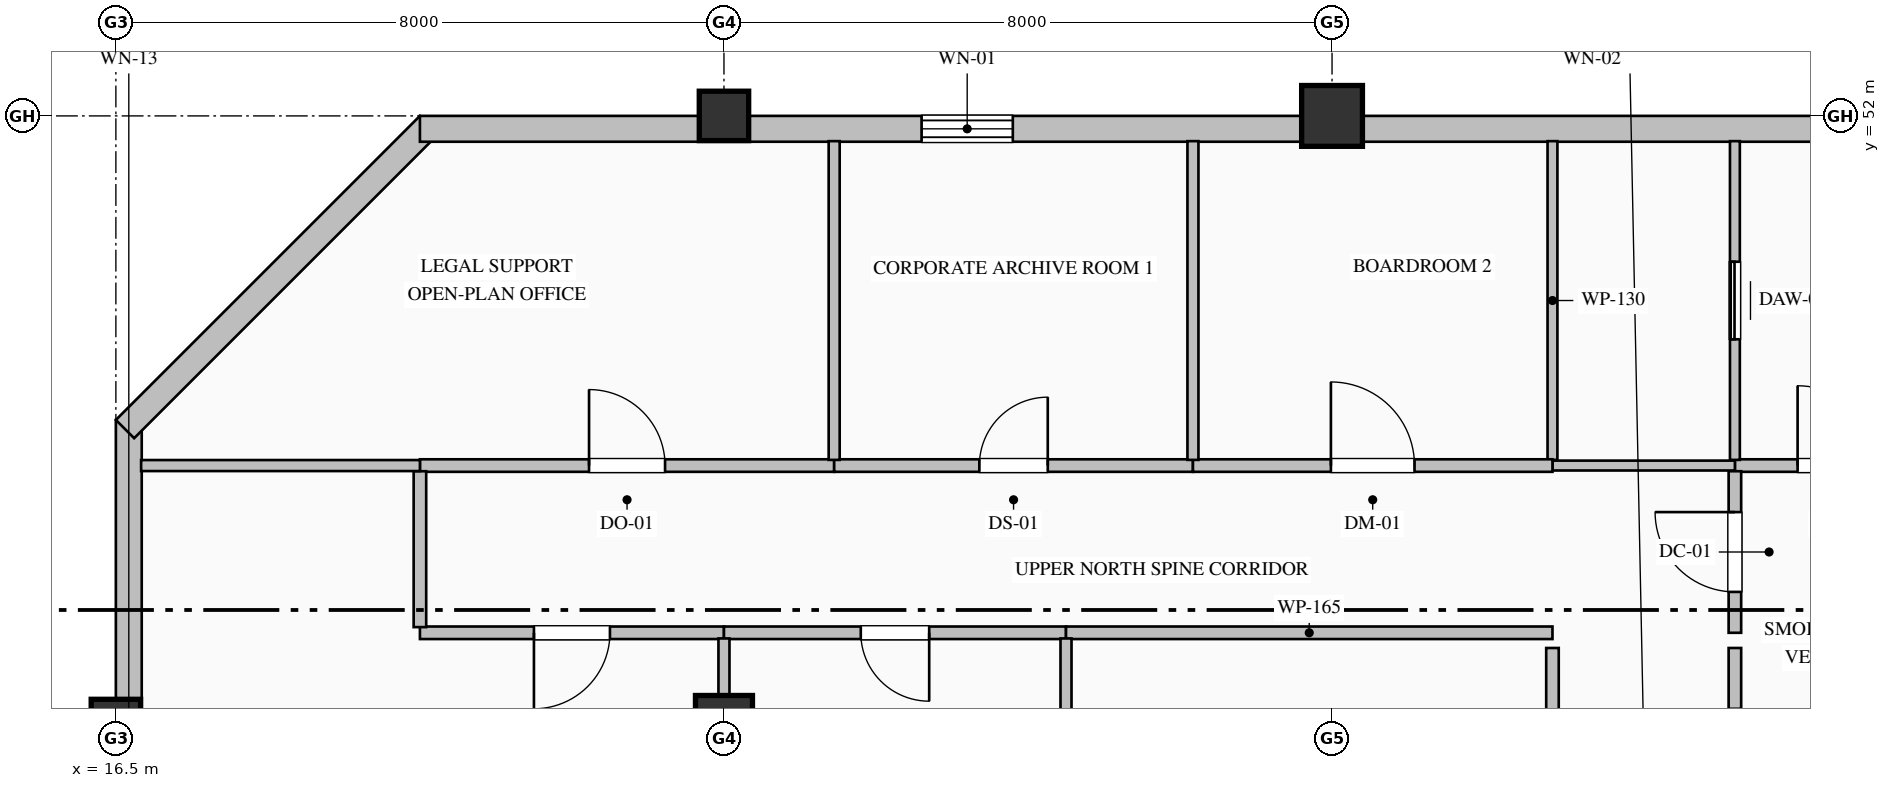
"""IFC4 building model, lengths in metres.
Left out: names, types, materials, properties, quantities, classifications, styles, units other than length and angle.
Written with IfcOpenShell. Run it as: python <this file> out.ifc"""

import sys

from ifc_helpers import new_model, si_unit, direction, frame, frame_2d, origin, origin_2d, place, context, subcontext, project, spatial, rectangle, hollow_rectangle, extrude, element, fill, save


model = new_model("IFC4")
c1 = context("Model", 3, precision=1e-05, world=origin(), true_north=direction((0.0, 1.0)))
c2 = subcontext(c1, "Body", "Model", "MODEL_VIEW")
j1 = project(units=[si_unit("LENGTHUNIT", "METRE"), si_unit("PLANEANGLEUNIT", "RADIAN")], contexts=[c1])
p1 = place(None, origin())
s1 = spatial("IfcSite", under=j1, at=p1, CompositionType="ELEMENT")
p2 = place(p1, origin())
s2 = spatial("IfcBuilding", under=s1, at=p2, CompositionType="ELEMENT")
p3 = place(p2, frame((0.0, 0.0, 363.2)))
s3 = spatial("IfcBuildingStorey", under=s2, at=p3, CompositionType="ELEMENT", Elevation=363.2)
p4 = place(p3, frame((16.5, 44.0, 0.0), z_axis=(0.0, 0.0, 1.0), x_axis=(1.0, 0.0, 0.0)))
e1 = element("IfcColumn", 1, at=p4, inside=s3, PredefinedType="COLUMN", context=c2, shape_type="SweptSolid", body=[
    extrude(hollow_rectangle(XDim=0.65, YDim=0.65, WallThickness=0.028, at=origin_2d()), origin(), (0.0, 0.0, 1.0), 4.0),
])
p5 = place(p3, frame((24.5, 44.0, 0.0), z_axis=(0.0, 0.0, 1.0), x_axis=(1.0, 0.0, 0.0)))
e2 = element("IfcColumn", 2, at=p5, inside=s3, PredefinedType="COLUMN", context=c2, shape_type="SweptSolid", body=[
    extrude(rectangle(XDim=0.75, YDim=0.75, at=origin_2d()), origin(), (0.0, 0.0, 1.0), 4.0),
])
p6 = place(p3, frame((24.5, 52.0, 0.0), z_axis=(0.0, 0.0, 1.0), x_axis=(1.0, 0.0, 0.0)))
e3 = element("IfcColumn", 3, at=p6, inside=s3, PredefinedType="COLUMN", context=c2, shape_type="SweptSolid", body=[
    extrude(hollow_rectangle(XDim=0.65, YDim=0.65, WallThickness=0.028, at=origin_2d()), origin(), (0.0, 0.0, 1.0), 4.0),
])
p7 = place(p3, frame((32.5, 52.0, 0.0), z_axis=(0.0, 0.0, 1.0), x_axis=(1.0, 0.0, 0.0)))
e4 = element("IfcColumn", 4, at=p7, inside=s3, PredefinedType="COLUMN", context=c2, shape_type="SweptSolid", body=[
    extrude(hollow_rectangle(XDim=0.8, YDim=0.8, WallThickness=0.032, at=origin_2d()), origin(), (0.0, 0.0, 1.0), 4.0),
])
p8 = place(p3, frame((16.67, 32.0, 0.0), z_axis=(0.0, 0.0, 1.0), x_axis=(0.0, 1.0, 0.0)))
e5 = element("IfcWall", 5, at=p8, inside=s3, PredefinedType="SOLIDWALL", context=c2, shape_type="SweptSolid", body=[
    extrude(rectangle(XDim=16.0, YDim=0.34, at=frame_2d((8.0, 0.0))), origin(), (0.0, 0.0, 1.0), 3.13),
])
p9 = place(p8, frame((6.525, 0.0, 0.9)))
e6 = element("IfcOpeningElement", 6, at=p9, cuts=e5, PredefinedType="OPENING", context=c2, shape_type="SweptSolid", body=[
    extrude(rectangle(XDim=1.35, YDim=1.85, at=frame_2d((0.675, 0.925))), frame((0.0, 0.18, 0.0), z_axis=(0.0, -1.0, 0.0), x_axis=(1.0, 0.0, 0.0)), (0.0, 0.0, 1.0), 0.36),
])
p10 = place(p8, frame((10.325, 0.0, 0.9)))
e7 = element("IfcOpeningElement", 7, at=p10, cuts=e5, PredefinedType="OPENING", context=c2, shape_type="SweptSolid", body=[
    extrude(rectangle(XDim=0.95, YDim=1.85, at=frame_2d((0.475, 0.925))), frame((0.0, 0.18, 0.0), z_axis=(0.0, -1.0, 0.0), x_axis=(1.0, 0.0, 0.0)), (0.0, 0.0, 1.0), 0.36),
])
p11 = place(p3, frame((16.62, 47.88, 0.0), z_axis=(0.0, 0.0, 1.0), x_axis=(0.707106781187, 0.707106781187, 0.0)))
e8 = element("IfcWall", 8, at=p11, inside=s3, PredefinedType="SOLIDWALL", context=c2, shape_type="SweptSolid", body=[
    extrude(rectangle(XDim=5.657, YDim=0.34, at=frame_2d((2.828, 0.0))), origin(), (0.0, 0.0, 1.0), 3.58),
])
p12 = place(p3, frame((20.5, 51.83, 0.0), z_axis=(0.0, 0.0, 1.0), x_axis=(1.0, 0.0, 0.0)))
e9 = element("IfcWall", 9, at=p12, inside=s3, PredefinedType="SOLIDWALL", context=c2, shape_type="SweptSolid", body=[
    extrude(rectangle(XDim=20.02, YDim=0.34, at=frame_2d((10.01, 0.0))), origin(), (0.0, 0.0, 1.0), 3.13),
])
p13 = place(p12, frame((6.6, 0.0, 0.7)))
e10 = element("IfcOpeningElement", 10, at=p13, cuts=e9, PredefinedType="OPENING", context=c2, shape_type="SweptSolid", body=[
    extrude(rectangle(XDim=1.2, YDim=1.85, at=frame_2d((0.6, 0.925))), frame((0.0, 0.18, 0.0), z_axis=(0.0, -1.0, 0.0), x_axis=(1.0, 0.0, 0.0)), (0.0, 0.0, 1.0), 0.36),
])
p14 = place(p3, frame((37.8, 47.4, 0.0), z_axis=(0.0, 0.0, 1.0), x_axis=(1.0, 0.0, 0.0)))
e11 = element("IfcWall", 11, at=p14, inside=s3, PredefinedType="PARTITIONING", context=c2, shape_type="SweptSolid", body=[
    extrude(rectangle(XDim=2.7, YDim=0.165, at=frame_2d((1.35, 0.0))), origin(), (0.0, 0.0, 1.0), 3.58),
])
p15 = place(p14, frame((0.825, 0.0, 0.0)))
e12 = element("IfcOpeningElement", 12, at=p15, cuts=e11, PredefinedType="OPENING", context=c2, shape_type="SweptSolid", body=[
    extrude(rectangle(XDim=1.05, YDim=2.15, at=frame_2d((0.525, 1.075))), frame((0.0, 0.093, 0.0), z_axis=(0.0, -1.0, 0.0), x_axis=(1.0, 0.0, 0.0)), (0.0, 0.0, 1.0), 0.185),
])
p16 = place(p3, frame((37.8, 45.2, 0.0), z_axis=(0.0, 0.0, 1.0), x_axis=(0.0, 1.0, 0.0)))
e13 = element("IfcWall", 13, at=p16, inside=s3, PredefinedType="PARTITIONING", context=c2, shape_type="SweptSolid", body=[
    extrude(rectangle(XDim=2.125, YDim=0.165, at=frame_2d((1.063, 0.0))), origin(), (0.0, 0.0, 1.0), 3.58),
])
p17 = place(p16, frame((0.538, 0.0, 0.0)))
e14 = element("IfcOpeningElement", 14, at=p17, cuts=e13, PredefinedType="OPENING", context=c2, shape_type="SweptSolid", body=[
    extrude(rectangle(XDim=1.05, YDim=2.15, at=frame_2d((0.525, 1.075))), frame((0.0, 0.093, 0.0), z_axis=(0.0, -1.0, 0.0), x_axis=(1.0, 0.0, 0.0)), (0.0, 0.0, 1.0), 0.185),
])
p18 = place(p3, frame((37.8, 44.2, 0.0), z_axis=(0.0, 0.0, 1.0), x_axis=(0.0, 1.0, 0.0)))
e15 = element("IfcWall", 15, at=p18, inside=s3, PredefinedType="PARTITIONING", context=c2, shape_type="SweptSolid", body=[
    extrude(rectangle(XDim=0.8, YDim=0.165, at=frame_2d((0.4, 0.0))), origin(), (0.0, 0.0, 1.0), 3.58),
])
p19 = place(p3, frame((37.8, 47.475, 0.0), z_axis=(0.0, 0.0, 1.0), x_axis=(0.0, 1.0, 0.0)))
e16 = element("IfcWall", 16, at=p19, inside=s3, PredefinedType="PARTITIONING", context=c2, shape_type="SweptSolid", body=[
    extrude(rectangle(XDim=4.193, YDim=0.13, at=frame_2d((2.097, 0.0))), origin(), (0.0, 0.0, 1.0), 3.58),
])
p20 = place(p19, frame((1.587, 0.0, 0.0)))
e17 = element("IfcOpeningElement", 17, at=p20, cuts=e16, PredefinedType="OPENING", context=c2, shape_type="SweptSolid", body=[
    extrude(rectangle(XDim=1.02, YDim=2.15, at=frame_2d((0.51, 1.075))), frame((0.0, 0.075, 0.0), z_axis=(0.0, -1.0, 0.0), x_axis=(1.0, 0.0, 0.0)), (0.0, 0.0, 1.0), 0.15),
])
p21 = place(p3, frame((37.8, 47.4, 0.0), z_axis=(0.0, 0.0, 1.0), x_axis=(-1.0, 0.0, 0.0)))
e18 = element("IfcWall", 18, at=p21, inside=s3, PredefinedType="PARTITIONING", context=c2, shape_type="SweptSolid", body=[
    extrude(rectangle(XDim=2.4, YDim=0.13, at=frame_2d((1.2, 0.0))), origin(), (0.0, 0.0, 1.0), 3.58),
])
p22 = place(p3, frame((35.4, 47.475, 0.0), z_axis=(0.0, 0.0, 1.0), x_axis=(0.0, 1.0, 0.0)))
e19 = element("IfcWall", 19, at=p22, inside=s3, PredefinedType="PARTITIONING", context=c2, shape_type="SweptSolid", body=[
    extrude(rectangle(XDim=4.193, YDim=0.13, at=frame_2d((2.097, 0.0))), origin(), (0.0, 0.0, 1.0), 3.58),
])
p23 = place(p3, frame((20.5, 47.4, 0.0), z_axis=(0.0, 0.0, 1.0), x_axis=(1.0, 0.0, 0.0)))
e20 = element("IfcWall", 20, at=p23, inside=s3, PredefinedType="PARTITIONING", context=c2, shape_type="SweptSolid", body=[
    extrude(rectangle(XDim=5.45, YDim=0.165, at=frame_2d((2.725, 0.0))), origin(), (0.0, 0.0, 1.0), 3.58),
])
p24 = place(p23, frame((2.225, 0.0, 0.0)))
e21 = element("IfcOpeningElement", 21, at=p24, cuts=e20, PredefinedType="OPENING", context=c2, shape_type="SweptSolid", body=[
    extrude(rectangle(XDim=1.0, YDim=2.15, at=frame_2d((0.5, 1.075))), frame((0.0, 0.093, 0.0), z_axis=(0.0, -1.0, 0.0), x_axis=(1.0, 0.0, 0.0)), (0.0, 0.0, 1.0), 0.185),
])
p25 = place(p3, frame((25.95, 47.4, 0.0), z_axis=(0.0, 0.0, 1.0), x_axis=(1.0, 0.0, 0.0)))
e22 = element("IfcWall", 22, at=p25, inside=s3, PredefinedType="PARTITIONING", context=c2, shape_type="SweptSolid", body=[
    extrude(rectangle(XDim=4.72, YDim=0.165, at=frame_2d((2.36, 0.0))), origin(), (0.0, 0.0, 1.0), 3.58),
])
p26 = place(p25, frame((1.91, 0.0, 0.0)))
e23 = element("IfcOpeningElement", 23, at=p26, cuts=e22, PredefinedType="OPENING", context=c2, shape_type="SweptSolid", body=[
    extrude(rectangle(XDim=0.9, YDim=2.15, at=frame_2d((0.45, 1.075))), frame((0.0, 0.093, 0.0), z_axis=(0.0, -1.0, 0.0), x_axis=(1.0, 0.0, 0.0)), (0.0, 0.0, 1.0), 0.185),
])
p27 = place(p3, frame((30.67, 47.4, 0.0), z_axis=(0.0, 0.0, 1.0), x_axis=(1.0, 0.0, 0.0)))
e24 = element("IfcWall", 24, at=p27, inside=s3, PredefinedType="PARTITIONING", context=c2, shape_type="SweptSolid", body=[
    extrude(rectangle(XDim=4.73, YDim=0.165, at=frame_2d((2.365, 0.0))), origin(), (0.0, 0.0, 1.0), 3.58),
])
p28 = place(p27, frame((1.815, 0.0, 0.0)))
e25 = element("IfcOpeningElement", 25, at=p28, cuts=e24, PredefinedType="OPENING", context=c2, shape_type="SweptSolid", body=[
    extrude(rectangle(XDim=1.1, YDim=2.2, at=frame_2d((0.55, 1.1))), frame((0.0, 0.093, 0.0), z_axis=(0.0, -1.0, 0.0), x_axis=(1.0, 0.0, 0.0)), (0.0, 0.0, 1.0), 0.185),
])
p29 = place(p3, frame((24.5, 45.2, 0.0), z_axis=(0.0, 0.0, 1.0), x_axis=(-1.0, 0.0, 0.0)))
e26 = element("IfcWall", 26, at=p29, inside=s3, PredefinedType="PARTITIONING", context=c2, shape_type="SweptSolid", body=[
    extrude(rectangle(XDim=4.0, YDim=0.165, at=frame_2d((2.0, 0.0))), origin(), (0.0, 0.0, 1.0), 3.58),
])
p30 = place(p29, frame((1.5, 0.0, 0.0)))
e27 = element("IfcOpeningElement", 27, at=p30, cuts=e26, PredefinedType="OPENING", context=c2, shape_type="SweptSolid", body=[
    extrude(rectangle(XDim=1.0, YDim=2.15, at=frame_2d((0.5, 1.075))), frame((0.0, 0.093, 0.0), z_axis=(0.0, -1.0, 0.0), x_axis=(1.0, 0.0, 0.0)), (0.0, 0.0, 1.0), 0.185),
])
p31 = place(p3, frame((20.5, 45.274, 0.0), z_axis=(0.0, 0.0, 1.0), x_axis=(0.0, 1.0, 0.0)))
e28 = element("IfcWall", 28, at=p31, inside=s3, PredefinedType="PARTITIONING", context=c2, shape_type="SweptSolid", body=[
    extrude(rectangle(XDim=2.051, YDim=0.165, at=frame_2d((1.025, 0.0))), origin(), (0.0, 0.0, 1.0), 3.58),
])
p32 = place(p3, frame((29.0, 45.2, 0.0), z_axis=(0.0, 0.0, 1.0), x_axis=(-1.0, 0.0, 0.0)))
e29 = element("IfcWall", 29, at=p32, inside=s3, PredefinedType="PARTITIONING", context=c2, shape_type="SweptSolid", body=[
    extrude(rectangle(XDim=4.5, YDim=0.165, at=frame_2d((2.25, 0.0))), origin(), (0.0, 0.0, 1.0), 3.58),
])
p33 = place(p32, frame((1.8, 0.0, 0.0)))
e30 = element("IfcOpeningElement", 30, at=p33, cuts=e29, PredefinedType="OPENING", context=c2, shape_type="SweptSolid", body=[
    extrude(rectangle(XDim=0.9, YDim=2.15, at=frame_2d((0.45, 1.075))), frame((0.0, 0.093, 0.0), z_axis=(0.0, -1.0, 0.0), x_axis=(1.0, 0.0, 0.0)), (0.0, 0.0, 1.0), 0.185),
])
p34 = place(p3, frame((35.4, 45.2, 0.0), z_axis=(0.0, 0.0, 1.0), x_axis=(-1.0, 0.0, 0.0)))
e31 = element("IfcWall", 31, at=p34, inside=s3, PredefinedType="PARTITIONING", context=c2, shape_type="SweptSolid", body=[
    extrude(rectangle(XDim=6.4, YDim=0.165, at=frame_2d((3.2, 0.0))), origin(), (0.0, 0.0, 1.0), 3.58),
])
p35 = place(p3, frame((35.4, 33.6, 0.0), z_axis=(0.0, 0.0, 1.0), x_axis=(0.0, 1.0, 0.0)))
e32 = element("IfcWall", 32, at=p35, inside=s3, PredefinedType="PARTITIONING", context=c2, shape_type="SweptSolid", body=[
    extrude(rectangle(XDim=11.4, YDim=0.165, at=frame_2d((5.7, 0.0))), origin(), (0.0, 0.0, 1.0), 3.58),
])
p36 = place(p35, frame((5.21, 0.0, 0.0)))
e33 = element("IfcOpeningElement", 33, at=p36, cuts=e32, PredefinedType="OPENING", context=c2, shape_type="SweptSolid", body=[
    extrude(rectangle(XDim=0.98, YDim=2.25, at=frame_2d((0.49, 1.125))), frame((0.0, 0.093, 0.0), z_axis=(0.0, -1.0, 0.0), x_axis=(1.0, 0.0, 0.0)), (0.0, 0.0, 1.0), 0.185),
])
p37 = place(p3, frame((25.95, 51.668, 0.0), z_axis=(0.0, 0.0, 1.0), x_axis=(0.0, -1.0, 0.0)))
e34 = element("IfcWall", 34, at=p37, inside=s3, PredefinedType="PARTITIONING", context=c2, shape_type="SweptSolid", body=[
    extrude(rectangle(XDim=4.193, YDim=0.145, at=frame_2d((2.097, 0.0))), origin(), (0.0, 0.0, 1.0), 3.58),
])
p38 = place(p3, frame((20.5, 47.4, 0.0), z_axis=(0.0, 0.0, 1.0), x_axis=(-1.0, 0.0, 0.0)))
e35 = element("IfcWall", 35, at=p38, inside=s3, PredefinedType="PARTITIONING", context=c2, shape_type="SweptSolid", body=[
    extrude(rectangle(XDim=3.668, YDim=0.145, at=frame_2d((1.834, 0.0))), origin(), (0.0, 0.0, 1.0), 3.58),
])
p39 = place(p3, frame((30.67, 51.668, 0.0), z_axis=(0.0, 0.0, 1.0), x_axis=(0.0, -1.0, 0.0)))
e36 = element("IfcWall", 36, at=p39, inside=s3, PredefinedType="PARTITIONING", context=c2, shape_type="SweptSolid", body=[
    extrude(rectangle(XDim=4.193, YDim=0.145, at=frame_2d((2.097, 0.0))), origin(), (0.0, 0.0, 1.0), 3.58),
])
p40 = place(p3, frame((24.5, 45.125, 0.0), z_axis=(0.0, 0.0, 1.0), x_axis=(0.0, -1.0, 0.0)))
e37 = element("IfcWall", 37, at=p40, inside=s3, PredefinedType="PARTITIONING", context=c2, shape_type="SweptSolid", body=[
    extrude(rectangle(XDim=16.793, YDim=0.145, at=frame_2d((8.397, 0.0))), origin(), (0.0, 0.0, 1.0), 2.972),
])
p41 = place(p3, frame((29.0, 45.125, 0.0), z_axis=(0.0, 0.0, 1.0), x_axis=(0.0, -1.0, 0.0)))
e38 = element("IfcWall", 38, at=p41, inside=s3, PredefinedType="PARTITIONING", context=c2, shape_type="SweptSolid", body=[
    extrude(rectangle(XDim=16.793, YDim=0.145, at=frame_2d((8.397, 0.0))), origin(), (0.0, 0.0, 1.0), 3.58),
])
p42 = place(p13, origin())
e39 = element("IfcWindow", 39, at=p42, inside=s3, PartitioningType="DOUBLE_PANEL_VERTICAL", PredefinedType="WINDOW", context=c2, shape_type="SweptSolid", body=[
    extrude(rectangle(XDim=1.2, YDim=1.85, at=frame_2d((0.6, 0.925))), frame((0.0, 0.15, 0.0), z_axis=(0.0, -1.0, 0.0), x_axis=(1.0, 0.0, 0.0)), (0.0, 0.0, 1.0), 0.06),
])
fill(e10, e39)
p43 = place(p15, origin())
e40 = element("IfcDoor", 40, at=p43, inside=s3, OperationType="SINGLE_SWING_LEFT", PredefinedType="DOOR", context=c2, shape_type="SweptSolid", body=[
    extrude(rectangle(XDim=1.05, YDim=2.15, at=frame_2d((0.525, 1.075))), frame((0.0, 0.025, 0.0), z_axis=(0.0, -1.0, 0.0), x_axis=(1.0, 0.0, 0.0)), (0.0, 0.0, 1.0), 0.05),
])
fill(e12, e40)
p44 = place(p17, origin())
e41 = element("IfcDoor", 41, at=p44, inside=s3, OperationType="SINGLE_SWING_RIGHT", PredefinedType="DOOR", context=c2, shape_type="SweptSolid", body=[
    extrude(rectangle(XDim=1.05, YDim=2.15, at=frame_2d((0.525, 1.075))), frame((0.0, 0.025, 0.0), z_axis=(0.0, -1.0, 0.0), x_axis=(1.0, 0.0, 0.0)), (0.0, 0.0, 1.0), 0.05),
])
fill(e14, e41)
p45 = place(p20, origin())
e42 = element("IfcDoor", 42, at=p45, inside=s3, OperationType="SLIDING_TO_LEFT", PredefinedType="DOOR", context=c2, shape_type="SweptSolid", body=[
    extrude(rectangle(XDim=1.02, YDim=2.15, at=frame_2d((0.51, 1.075))), frame((0.0, 0.025, 0.0), z_axis=(0.0, -1.0, 0.0), x_axis=(1.0, 0.0, 0.0)), (0.0, 0.0, 1.0), 0.05),
])
fill(e17, e42)
p46 = place(p24, origin())
e43 = element("IfcDoor", 43, at=p46, inside=s3, OperationType="SINGLE_SWING_LEFT", PredefinedType="DOOR", context=c2, shape_type="SweptSolid", body=[
    extrude(rectangle(XDim=1.0, YDim=2.15, at=frame_2d((0.5, 1.075))), frame((0.0, 0.025, 0.0), z_axis=(0.0, -1.0, 0.0), x_axis=(1.0, 0.0, 0.0)), (0.0, 0.0, 1.0), 0.05),
])
fill(e21, e43)
p47 = place(p26, origin())
e44 = element("IfcDoor", 44, at=p47, inside=s3, OperationType="SINGLE_SWING_RIGHT", PredefinedType="DOOR", context=c2, shape_type="SweptSolid", body=[
    extrude(rectangle(XDim=0.9, YDim=2.15, at=frame_2d((0.45, 1.075))), frame((0.0, 0.025, 0.0), z_axis=(0.0, -1.0, 0.0), x_axis=(1.0, 0.0, 0.0)), (0.0, 0.0, 1.0), 0.05),
])
fill(e23, e44)
p48 = place(p28, origin())
e45 = element("IfcDoor", 45, at=p48, inside=s3, OperationType="SINGLE_SWING_LEFT", PredefinedType="DOOR", context=c2, shape_type="SweptSolid", body=[
    extrude(rectangle(XDim=1.1, YDim=2.2, at=frame_2d((0.55, 1.1))), frame((0.0, 0.025, 0.0), z_axis=(0.0, -1.0, 0.0), x_axis=(1.0, 0.0, 0.0)), (0.0, 0.0, 1.0), 0.05),
])
fill(e25, e45)
p49 = place(p30, origin())
e46 = element("IfcDoor", 46, at=p49, inside=s3, OperationType="SINGLE_SWING_RIGHT", PredefinedType="DOOR", context=c2, shape_type="SweptSolid", body=[
    extrude(rectangle(XDim=1.0, YDim=2.15, at=frame_2d((0.5, 1.075))), frame((0.0, 0.025, 0.0), z_axis=(0.0, -1.0, 0.0), x_axis=(1.0, 0.0, 0.0)), (0.0, 0.0, 1.0), 0.05),
])
fill(e27, e46)
p50 = place(p33, origin())
e47 = element("IfcDoor", 47, at=p50, inside=s3, OperationType="SINGLE_SWING_LEFT", PredefinedType="DOOR", context=c2, shape_type="SweptSolid", body=[
    extrude(rectangle(XDim=0.9, YDim=2.15, at=frame_2d((0.45, 1.075))), frame((0.0, 0.025, 0.0), z_axis=(0.0, -1.0, 0.0), x_axis=(1.0, 0.0, 0.0)), (0.0, 0.0, 1.0), 0.05),
])
fill(e30, e47)
save(model, sys.argv[1])
